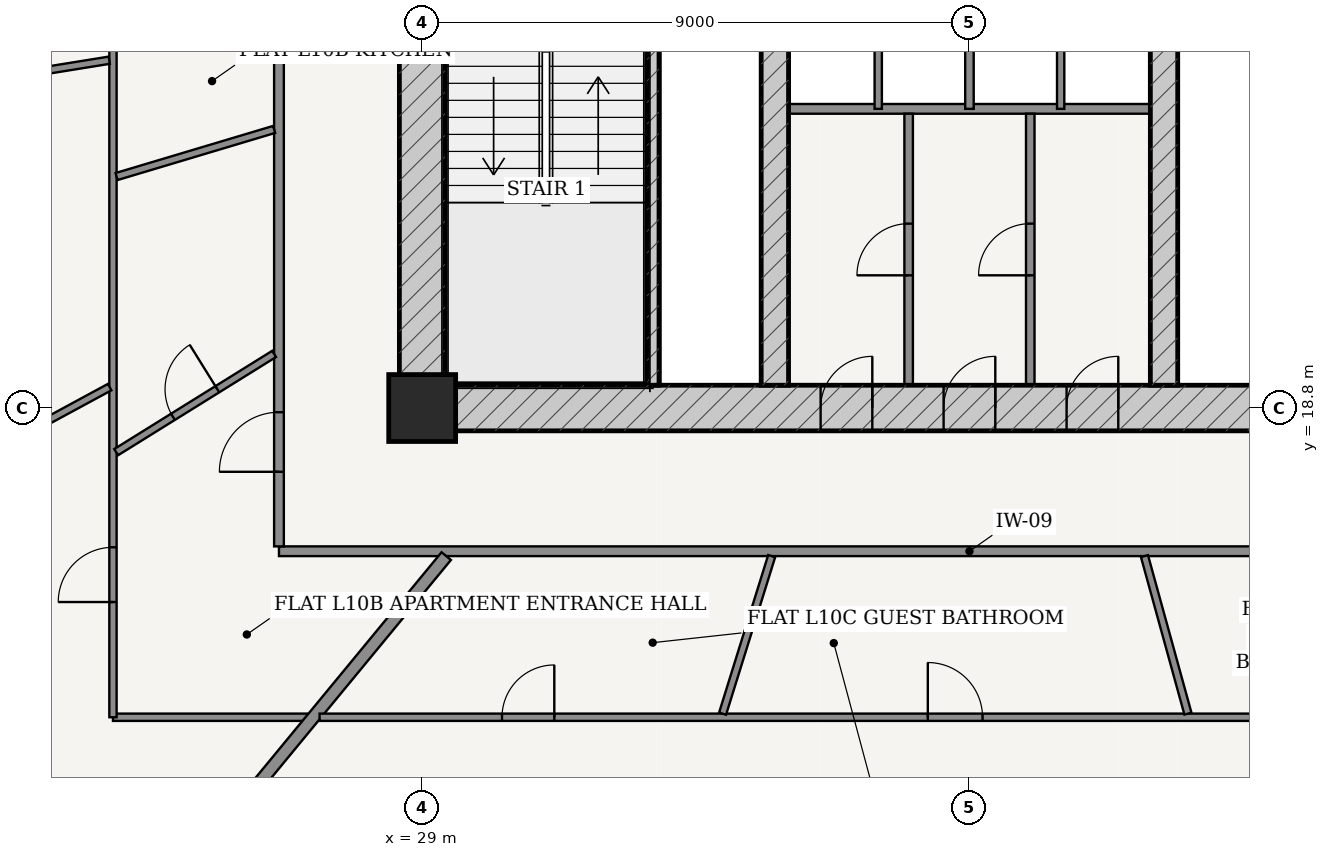
"""IFC4 building model, lengths in metres.
Left out: names, types, materials, properties, quantities, classifications, styles, units other than length and angle.
Written with IfcOpenShell. Run it as: python <this file> out.ifc"""

import sys

from ifc_helpers import new_model, si_unit, direction, frame, frame_2d, origin, origin_2d, place, context, subcontext, project, spatial, rectangle, extrude, source, transform, mapped, element, fill, save


model = new_model("IFC4")
c1 = context("Model", 3, precision=1e-05, world=origin(), true_north=direction((-0.2419218956, 0.970295726276)))
c2 = subcontext(c1, "Body", "Model", "MODEL_VIEW")
j1 = project(units=[si_unit("LENGTHUNIT", "METRE"), si_unit("PLANEANGLEUNIT", "RADIAN")], contexts=[c1])
p1 = place(None, origin())
s1 = spatial("IfcSite", under=j1, at=p1, CompositionType="ELEMENT")
p2 = place(p1, origin())
s2 = spatial("IfcBuilding", under=s1, at=p2, CompositionType="ELEMENT")
p3 = place(p2, frame((0.0, 0.0, 42.0)))
s3 = spatial("IfcBuildingStorey", under=s2, at=p3, CompositionType="ELEMENT", Elevation=42.0)
p4 = place(p3, frame((29.0, 18.8, 0.0), z_axis=(0.0, 0.0, 1.0), x_axis=(1.0, 0.0, 0.0)))
e1 = element("IfcColumn", 1, at=p4, inside=s3, PredefinedType="COLUMN", context=c2, shape_type="SweptSolid", body=[
    extrude(rectangle(XDim=1.1, YDim=1.1, at=origin_2d()), origin(), (0.0, 0.0, 1.0), 3.6),
])
p5 = place(p3, frame((28.625, 18.8, 0.0), z_axis=(0.0, 0.0, 1.0), x_axis=(1.0, 0.0, 0.0)))
e2 = element("IfcWall", 2, at=p5, inside=s3, PredefinedType="SHEAR", context=c2, shape_type="SweptSolid", body=[
    extrude(rectangle(XDim=18.75, YDim=0.75, at=frame_2d((9.375, 0.0))), origin(), (0.0, 0.0, 1.0), 3.32),
])
p6 = place(p5, frame((6.927, 0.0, 0.0)))
e3 = element("IfcOpeningElement", 3, at=p6, cuts=e2, PredefinedType="OPENING", context=c2, shape_type="SweptSolid", body=[
    extrude(rectangle(XDim=0.85, YDim=2.1, at=frame_2d((0.425, 1.05))), frame((0.0, 0.385, 0.0), z_axis=(0.0, -1.0, 0.0), x_axis=(1.0, 0.0, 0.0)), (0.0, 0.0, 1.0), 0.77),
])
p7 = place(p5, frame((8.95, 0.0, 0.0)))
e4 = element("IfcOpeningElement", 4, at=p7, cuts=e2, PredefinedType="OPENING", context=c2, shape_type="SweptSolid", body=[
    extrude(rectangle(XDim=0.85, YDim=2.1, at=frame_2d((0.425, 1.05))), frame((0.0, 0.385, 0.0), z_axis=(0.0, -1.0, 0.0), x_axis=(1.0, 0.0, 0.0)), (0.0, 0.0, 1.0), 0.77),
])
p8 = place(p5, frame((10.972, 0.0, 0.0)))
e5 = element("IfcOpeningElement", 5, at=p8, cuts=e2, PredefinedType="OPENING", context=c2, shape_type="SweptSolid", body=[
    extrude(rectangle(XDim=0.85, YDim=2.1, at=frame_2d((0.425, 1.05))), frame((0.0, 0.385, 0.0), z_axis=(0.0, -1.0, 0.0), x_axis=(1.0, 0.0, 0.0)), (0.0, 0.0, 1.0), 0.77),
])
p9 = place(p3, frame((29.0, 19.175, 0.0), z_axis=(0.0, 0.0, 1.0), x_axis=(0.0, 1.0, 0.0)))
e6 = element("IfcWall", 6, at=p9, inside=s3, PredefinedType="SHEAR", context=c2, shape_type="SweptSolid", body=[
    extrude(rectangle(XDim=15.25, YDim=0.75, at=frame_2d((7.625, 0.0))), origin(), (0.0, 0.0, 1.0), 3.32),
])
p10 = place(p9, frame((9.875, 0.0, 0.0)))
e7 = element("IfcOpeningElement", 7, at=p10, cuts=e6, PredefinedType="OPENING", context=c2, shape_type="SweptSolid", body=[
    extrude(rectangle(XDim=1.5, YDim=2.2, at=frame_2d((0.75, 1.1))), frame((0.0, 0.385, 0.0), z_axis=(0.0, -1.0, 0.0), x_axis=(1.0, 0.0, 0.0)), (0.0, 0.0, 1.0), 0.77),
])
p11 = place(p3, frame((32.795, 19.175, 0.0), z_axis=(0.0, 0.0, 1.0), x_axis=(0.0, 1.0, 0.0)))
e8 = element("IfcWall", 8, at=p11, inside=s3, PredefinedType="SOLIDWALL", context=c2, shape_type="SweptSolid", body=[
    extrude(rectangle(XDim=7.375, YDim=0.2, at=frame_2d((3.688, 0.0))), origin(), (0.0, 0.0, 1.0), 3.32),
])
p12 = place(p3, frame((34.8, 19.175, 0.0), z_axis=(0.0, 0.0, 1.0), x_axis=(0.0, 1.0, 0.0)))
e9 = element("IfcWall", 9, at=p12, inside=s3, PredefinedType="SHEAR", context=c2, shape_type="SweptSolid", body=[
    extrude(rectangle(XDim=15.25, YDim=0.45, at=frame_2d((7.625, 0.0))), origin(), (0.0, 0.0, 1.0), 3.32),
])
p13 = place(p12, frame((7.8, 0.0, 0.0)))
e10 = element("IfcOpeningElement", 10, at=p13, cuts=e9, PredefinedType="OPENING", context=c2, shape_type="SweptSolid", body=[
    extrude(rectangle(XDim=1.05, YDim=2.15, at=frame_2d((0.525, 1.075))), frame((0.0, 0.235, 0.0), z_axis=(0.0, -1.0, 0.0), x_axis=(1.0, 0.0, 0.0)), (0.0, 0.0, 1.0), 0.47),
])
p14 = place(p3, frame((41.2, 19.175, 0.0), z_axis=(0.0, 0.0, 1.0), x_axis=(0.0, 1.0, 0.0)))
e11 = element("IfcWall", 11, at=p14, inside=s3, PredefinedType="SHEAR", context=c2, shape_type="SweptSolid", body=[
    extrude(rectangle(XDim=15.25, YDim=0.45, at=frame_2d((7.625, 0.0))), origin(), (0.0, 0.0, 1.0), 3.32),
])
p15 = place(p14, frame((7.8, 0.0, 0.0)))
e12 = element("IfcOpeningElement", 12, at=p15, cuts=e11, PredefinedType="OPENING", context=c2, shape_type="SweptSolid", body=[
    extrude(rectangle(XDim=1.05, YDim=2.15, at=frame_2d((0.525, 1.075))), frame((0.0, 0.235, 0.0), z_axis=(0.0, -1.0, 0.0), x_axis=(1.0, 0.0, 0.0)), (0.0, 0.0, 1.0), 0.47),
])
p16 = place(p3, frame((35.025, 23.72, 0.0), z_axis=(0.0, 0.0, 1.0), x_axis=(1.0, 0.0, 0.0)))
e13 = element("IfcWall", 13, at=p16, inside=s3, PredefinedType="PARTITIONING", context=c2, shape_type="SweptSolid", body=[
    extrude(rectangle(XDim=5.95, YDim=0.16, at=frame_2d((2.975, 0.0))), origin(), (0.0, 0.0, 1.0), 3.32),
])
p17 = place(p3, frame((36.5, 23.72, 0.0), z_axis=(0.0, 0.0, 1.0), x_axis=(0.0, 1.0, 0.0)))
e14 = element("IfcWall", 14, at=p17, inside=s3, PredefinedType="PARTITIONING", context=c2, shape_type="SweptSolid", body=[
    extrude(rectangle(XDim=2.56, YDim=0.12, at=frame_2d((1.28, 0.0))), origin(), (0.0, 0.0, 1.0), 3.32),
])
p18 = place(p3, frame((38.0, 23.72, 0.0), z_axis=(0.0, 0.0, 1.0), x_axis=(0.0, 1.0, 0.0)))
e15 = element("IfcWall", 15, at=p18, inside=s3, PredefinedType="PARTITIONING", context=c2, shape_type="SweptSolid", body=[
    extrude(rectangle(XDim=2.56, YDim=0.14, at=frame_2d((1.28, 0.0))), origin(), (0.0, 0.0, 1.0), 3.32),
])
p19 = place(p3, frame((39.5, 23.72, 0.0), z_axis=(0.0, 0.0, 1.0), x_axis=(0.0, 1.0, 0.0)))
e16 = element("IfcWall", 16, at=p19, inside=s3, PredefinedType="PARTITIONING", context=c2, shape_type="SweptSolid", body=[
    extrude(rectangle(XDim=2.56, YDim=0.12, at=frame_2d((1.28, 0.0))), origin(), (0.0, 0.0, 1.0), 3.32),
])
p20 = place(p3, frame((37.0, 19.175, 0.0), z_axis=(0.0, 0.0, 1.0), x_axis=(0.0, 1.0, 0.0)))
e17 = element("IfcWall", 17, at=p20, inside=s3, PredefinedType="PARTITIONING", context=c2, shape_type="SweptSolid", body=[
    extrude(rectangle(XDim=4.465, YDim=0.14, at=frame_2d((2.232, 0.0))), origin(), (0.0, 0.0, 1.0), 3.32),
])
p21 = place(p20, frame((1.808, 0.0, 0.0)))
e18 = element("IfcOpeningElement", 18, at=p21, cuts=e17, PredefinedType="OPENING", context=c2, shape_type="SweptSolid", body=[
    extrude(rectangle(XDim=0.85, YDim=2.1, at=frame_2d((0.425, 1.05))), frame((0.0, 0.08, 0.0), z_axis=(0.0, -1.0, 0.0), x_axis=(1.0, 0.0, 0.0)), (0.0, 0.0, 1.0), 0.16),
])
p22 = place(p3, frame((39.0, 19.175, 0.0), z_axis=(0.0, 0.0, 1.0), x_axis=(0.0, 1.0, 0.0)))
e19 = element("IfcWall", 19, at=p22, inside=s3, PredefinedType="PARTITIONING", context=c2, shape_type="SweptSolid", body=[
    extrude(rectangle(XDim=4.465, YDim=0.14, at=frame_2d((2.232, 0.0))), origin(), (0.0, 0.0, 1.0), 3.32),
])
p23 = place(p22, frame((1.808, 0.0, 0.0)))
e20 = element("IfcOpeningElement", 20, at=p23, cuts=e19, PredefinedType="OPENING", context=c2, shape_type="SweptSolid", body=[
    extrude(rectangle(XDim=0.85, YDim=2.1, at=frame_2d((0.425, 1.05))), frame((0.0, 0.08, 0.0), z_axis=(0.0, -1.0, 0.0), x_axis=(1.0, 0.0, 0.0)), (0.0, 0.0, 1.0), 0.16),
])
p24 = place(p3, frame((26.645, 16.445, 0.0), z_axis=(0.0, 0.0, 1.0), x_axis=(1.0, 0.0, 0.0)))
e21 = element("IfcWall", 21, at=p24, inside=s3, PredefinedType="PARTITIONING", context=c2, shape_type="SweptSolid", body=[
    extrude(rectangle(XDim=22.71, YDim=0.16, at=frame_2d((11.355, 0.0))), origin(), (0.0, 0.0, 1.0), 2.688),
])
p25 = place(p3, frame((26.645, 16.525, 0.0), z_axis=(0.0, 0.0, 1.0), x_axis=(0.0, 1.0, 0.0)))
e22 = element("IfcWall", 22, at=p25, inside=s3, PredefinedType="PARTITIONING", context=c2, shape_type="SweptSolid", body=[
    extrude(rectangle(XDim=20.55, YDim=0.16, at=frame_2d((10.275, 0.0))), origin(), (0.0, 0.0, 1.0), 2.688),
])
p26 = place(p25, frame((1.226, 0.0, 0.0)))
e23 = element("IfcOpeningElement", 23, at=p26, cuts=e22, PredefinedType="OPENING", context=c2, shape_type="SweptSolid", body=[
    extrude(rectangle(XDim=0.98, YDim=2.2, at=frame_2d((0.49, 1.1))), frame((0.0, 0.09, 0.0), z_axis=(0.0, -1.0, 0.0), x_axis=(1.0, 0.0, 0.0)), (0.0, 0.0, 1.0), 0.18),
])
p27 = place(p3, frame((27.109, 13.715, 0.0), z_axis=(0.0, 0.0, 1.0), x_axis=(-1.0, 0.0, 0.0)))
e24 = element("IfcWall", 24, at=p27, inside=s3, PredefinedType="PARTITIONING", context=c2, shape_type="SweptSolid", body=[
    extrude(rectangle(XDim=3.194, YDim=0.12, at=frame_2d((1.597, 0.0))), origin(), (0.0, 0.0, 1.0), 2.688),
])
p28 = place(p3, frame((23.915, 13.715, 0.0), z_axis=(0.0, 0.0, 1.0), x_axis=(0.0, 1.0, 0.0)))
e25 = element("IfcWall", 25, at=p28, inside=s3, PredefinedType="PARTITIONING", context=c2, shape_type="SweptSolid", body=[
    extrude(rectangle(XDim=26.17, YDim=0.12, at=frame_2d((13.085, 0.0))), origin(), (0.0, 0.0, 1.0), 2.688),
])
p29 = place(p28, frame((1.895, 0.0, 0.0)))
e26 = element("IfcOpeningElement", 26, at=p29, cuts=e25, PredefinedType="OPENING", context=c2, shape_type="SweptSolid", body=[
    extrude(rectangle(XDim=0.9, YDim=2.15, at=frame_2d((0.45, 1.075))), frame((0.0, 0.07, 0.0), z_axis=(0.0, -1.0, 0.0), x_axis=(1.0, 0.0, 0.0)), (0.0, 0.0, 1.0), 0.14),
])
p30 = place(p28, frame((11.498, 0.0, 0.0)))
e27 = element("IfcOpeningElement", 27, at=p30, cuts=e25, PredefinedType="OPENING", context=c2, shape_type="SweptSolid", body=[
    extrude(rectangle(XDim=0.9, YDim=2.15, at=frame_2d((0.45, 1.075))), frame((0.0, 0.07, 0.0), z_axis=(0.0, -1.0, 0.0), x_axis=(1.0, 0.0, 0.0)), (0.0, 0.0, 1.0), 0.14),
])
p31 = place(p28, frame((23.831, 0.0, 0.0)))
e28 = element("IfcOpeningElement", 28, at=p31, cuts=e25, PredefinedType="OPENING", context=c2, shape_type="SweptSolid", body=[
    extrude(rectangle(XDim=0.86, YDim=2.15, at=frame_2d((0.43, 1.075))), frame((0.0, 0.07, 0.0), z_axis=(0.0, -1.0, 0.0), x_axis=(1.0, 0.0, 0.0)), (0.0, 0.0, 1.0), 0.14),
])
p32 = place(p3, frame((23.854, 24.52, 0.0), z_axis=(0.0, 0.0, 1.0), x_axis=(-0.987258444847, -0.159124991997, 0.0)))
e29 = element("IfcWall", 29, at=p32, inside=s3, PredefinedType="PARTITIONING", context=c2, shape_type="SweptSolid", body=[
    extrude(rectangle(XDim=14.359, YDim=0.12, at=frame_2d((7.18, 0.0))), origin(), (0.0, 0.0, 1.0), 2.688),
])
p33 = place(p32, frame((5.659, 0.0, 0.0)))
e30 = element("IfcOpeningElement", 30, at=p33, cuts=e29, PredefinedType="OPENING", context=c2, shape_type="SweptSolid", body=[
    extrude(rectangle(XDim=0.9, YDim=2.15, at=frame_2d((0.45, 1.075))), frame((0.0, 0.07, 0.0), z_axis=(0.0, -1.0, 0.0), x_axis=(1.0, 0.0, 0.0)), (0.0, 0.0, 1.0), 0.14),
])
p34 = place(p3, frame((23.861, 19.144, 0.0), z_axis=(0.0, 0.0, 1.0), x_axis=(-0.879372452045, -0.476134529922, 0.0)))
e31 = element("IfcWall", 31, at=p34, inside=s3, PredefinedType="PARTITIONING", context=c2, shape_type="SweptSolid", body=[
    extrude(rectangle(XDim=11.219, YDim=0.12, at=frame_2d((5.61, 0.0))), origin(), (0.0, 0.0, 1.0), 2.688),
])
p35 = place(p34, frame((4.097, 0.0, 0.0)))
e32 = element("IfcOpeningElement", 32, at=p35, cuts=e31, PredefinedType="OPENING", context=c2, shape_type="SweptSolid", body=[
    extrude(rectangle(XDim=0.9, YDim=2.15, at=frame_2d((0.45, 1.075))), frame((0.0, 0.07, 0.0), z_axis=(0.0, -1.0, 0.0), x_axis=(1.0, 0.0, 0.0)), (0.0, 0.0, 1.0), 0.14),
])
p36 = place(p3, frame((26.565, 23.382, 0.0), z_axis=(0.0, 0.0, 1.0), x_axis=(-0.958081868855, -0.286494559408, 0.0)))
e33 = element("IfcWall", 33, at=p36, inside=s3, PredefinedType="PARTITIONING", context=c2, shape_type="SweptSolid", body=[
    extrude(rectangle(XDim=2.704, YDim=0.12, at=frame_2d((1.352, 0.0))), origin(), (0.0, 0.0, 1.0), 3.32),
])
p37 = place(p3, frame((26.565, 19.69, 0.0), z_axis=(0.0, 0.0, 1.0), x_axis=(-0.849229217796, -0.52802437031, 0.0)))
e34 = element("IfcWall", 34, at=p37, inside=s3, PredefinedType="PARTITIONING", context=c2, shape_type="SweptSolid", body=[
    extrude(rectangle(XDim=3.059, YDim=0.12, at=frame_2d((1.529, 0.0))), origin(), (0.0, 0.0, 1.0), 3.32),
])
p38 = place(p37, frame((1.099, 0.0, 0.0)))
e35 = element("IfcOpeningElement", 35, at=p38, cuts=e34, PredefinedType="OPENING", context=c2, shape_type="SweptSolid", body=[
    extrude(rectangle(XDim=0.86, YDim=2.15, at=frame_2d((0.43, 1.075))), frame((0.0, 0.07, 0.0), z_axis=(0.0, -1.0, 0.0), x_axis=(1.0, 0.0, 0.0)), (0.0, 0.0, 1.0), 0.14),
])
p39 = place(p3, frame((29.396, 16.365, 0.0), z_axis=(0.0, 0.0, 1.0), x_axis=(-0.636186165667, -0.771535587393, 0.0)))
e36 = element("IfcWall", 36, at=p39, inside=s3, PredefinedType="PARTITIONING", context=c2, shape_type="SweptSolid", body=[
    extrude(rectangle(XDim=11.683, YDim=0.2, at=frame_2d((5.842, 0.0))), origin(), (0.0, 0.0, 1.0), 2.688),
])
p40 = place(p3, frame((52.085, 13.715, 0.0), z_axis=(0.0, 0.0, 1.0), x_axis=(-1.0, 0.0, 0.0)))
e37 = element("IfcWall", 37, at=p40, inside=s3, PredefinedType="PARTITIONING", context=c2, shape_type="SweptSolid", body=[
    extrude(rectangle(XDim=24.772, YDim=0.12, at=frame_2d((12.386, 0.0))), origin(), (0.0, 0.0, 1.0), 2.688),
])
p41 = place(p40, frame((20.912, 0.0, 0.0)))
e38 = element("IfcOpeningElement", 38, at=p41, cuts=e37, PredefinedType="OPENING", context=c2, shape_type="SweptSolid", body=[
    extrude(rectangle(XDim=0.86, YDim=2.15, at=frame_2d((0.43, 1.075))), frame((0.0, 0.07, 0.0), z_axis=(0.0, -1.0, 0.0), x_axis=(1.0, 0.0, 0.0)), (0.0, 0.0, 1.0), 0.14),
])
p42 = place(p40, frame((13.87, 0.0, 0.0)))
e39 = element("IfcOpeningElement", 39, at=p42, cuts=e37, PredefinedType="OPENING", context=c2, shape_type="SweptSolid", body=[
    extrude(rectangle(XDim=0.9, YDim=2.15, at=frame_2d((0.45, 1.075))), frame((0.0, 0.07, 0.0), z_axis=(0.0, -1.0, 0.0), x_axis=(1.0, 0.0, 0.0)), (0.0, 0.0, 1.0), 0.14),
])
p43 = place(p3, frame((34.748, 16.365, 0.0), z_axis=(0.0, 0.0, 1.0), x_axis=(-0.297598752493, -0.954691040345, 0.0)))
e40 = element("IfcWall", 40, at=p43, inside=s3, PredefinedType="PARTITIONING", context=c2, shape_type="SweptSolid", body=[
    extrude(rectangle(XDim=2.714, YDim=0.12, at=frame_2d((1.357, 0.0))), origin(), (0.0, 0.0, 1.0), 3.32),
])
p44 = place(p3, frame((40.878, 16.365, 0.0), z_axis=(0.0, 0.0, 1.0), x_axis=(0.265853298244, -0.964013497734, 0.0)))
e41 = element("IfcWall", 41, at=p44, inside=s3, PredefinedType="PARTITIONING", context=c2, shape_type="SweptSolid", body=[
    extrude(rectangle(XDim=2.687, YDim=0.12, at=frame_2d((1.344, 0.0))), origin(), (0.0, 0.0, 1.0), 3.32),
])
m1 = source(origin(), c2, "Body", "SweptSolid", [
    extrude(rectangle(XDim=0.85, YDim=2.1, at=frame_2d((0.425, 1.05))), frame((0.0, 0.025, 0.0), z_axis=(0.0, -1.0, 0.0), x_axis=(1.0, 0.0, 0.0)), (0.0, 0.0, 1.0), 0.05),
])
p45 = place(p6, origin())
e42 = element("IfcDoor", 42, at=p45, inside=s3, OperationType="SINGLE_SWING_RIGHT", PredefinedType="DOOR", context=c2, shape_type="MappedRepresentation", body=[
    mapped(m1, transform((0.0, 0.0, 0.0), scale=1.0)),
])
fill(e3, e42)
p46 = place(p7, origin())
e43 = element("IfcDoor", 43, at=p46, inside=s3, OperationType="SINGLE_SWING_RIGHT", PredefinedType="DOOR", context=c2, shape_type="MappedRepresentation", body=[
    mapped(m1, transform((0.0, 0.0, 0.0), scale=1.0)),
])
fill(e4, e43)
p47 = place(p8, origin())
e44 = element("IfcDoor", 44, at=p47, inside=s3, OperationType="SINGLE_SWING_RIGHT", PredefinedType="DOOR", context=c2, shape_type="MappedRepresentation", body=[
    mapped(m1, transform((0.0, 0.0, 0.0), scale=1.0)),
])
fill(e5, e44)
p48 = place(p21, origin())
e45 = element("IfcDoor", 45, at=p48, inside=s3, OperationType="SINGLE_SWING_LEFT", PredefinedType="DOOR", context=c2, shape_type="MappedRepresentation", body=[
    mapped(m1, transform((0.0, 0.0, 0.0), scale=1.0)),
])
fill(e18, e45)
p49 = place(p23, origin())
e46 = element("IfcDoor", 46, at=p49, inside=s3, OperationType="SINGLE_SWING_LEFT", PredefinedType="DOOR", context=c2, shape_type="MappedRepresentation", body=[
    mapped(m1, transform((0.0, 0.0, 0.0), scale=1.0)),
])
fill(e20, e46)
m2 = source(origin(), c2, "Body", "SweptSolid", [
    extrude(rectangle(XDim=0.98, YDim=2.2, at=frame_2d((0.49, 1.1))), frame((0.0, 0.025, 0.0), z_axis=(0.0, -1.0, 0.0), x_axis=(1.0, 0.0, 0.0)), (0.0, 0.0, 1.0), 0.05),
])
p50 = place(p26, origin())
e47 = element("IfcDoor", 47, at=p50, inside=s3, OperationType="SINGLE_SWING_LEFT", PredefinedType="DOOR", context=c2, shape_type="MappedRepresentation", body=[
    mapped(m2, transform((0.0, 0.0, 0.0), scale=1.0)),
])
fill(e23, e47)
m3 = source(origin(), c2, "Body", "SweptSolid", [
    extrude(rectangle(XDim=0.86, YDim=2.15, at=frame_2d((0.43, 1.075))), frame((0.0, 0.025, 0.0), z_axis=(0.0, -1.0, 0.0), x_axis=(1.0, 0.0, 0.0)), (0.0, 0.0, 1.0), 0.05),
])
p51 = place(p38, frame((0.86, 0.0, 0.0), z_axis=(0.0, 0.0, 1.0), x_axis=(-1.0, 0.0, 0.0)))
e48 = element("IfcDoor", 48, at=p51, inside=s3, OperationType="SINGLE_SWING_RIGHT", PredefinedType="DOOR", context=c2, shape_type="MappedRepresentation", body=[
    mapped(m3, transform((0.0, 0.0, 0.0), scale=1.0)),
])
fill(e35, e48)
m4 = source(origin(), c2, "Body", "SweptSolid", [
    extrude(rectangle(XDim=0.9, YDim=2.15, at=frame_2d((0.45, 1.075))), frame((0.0, 0.025, 0.0), z_axis=(0.0, -1.0, 0.0), x_axis=(1.0, 0.0, 0.0)), (0.0, 0.0, 1.0), 0.05),
])
p52 = place(p29, origin())
e49 = element("IfcDoor", 49, at=p52, inside=s3, OperationType="SINGLE_SWING_LEFT", PredefinedType="DOOR", context=c2, shape_type="MappedRepresentation", body=[
    mapped(m4, transform((0.0, 0.0, 0.0), scale=1.0)),
])
fill(e26, e49)
p53 = place(p41, frame((0.86, 0.0, 0.0), z_axis=(0.0, 0.0, 1.0), x_axis=(-1.0, 0.0, 0.0)))
e50 = element("IfcDoor", 50, at=p53, inside=s3, OperationType="SINGLE_SWING_RIGHT", PredefinedType="DOOR", context=c2, shape_type="MappedRepresentation", body=[
    mapped(m3, transform((0.0, 0.0, 0.0), scale=1.0)),
])
fill(e38, e50)
p54 = place(p42, frame((0.9, 0.0, 0.0), z_axis=(0.0, 0.0, 1.0), x_axis=(-1.0, 0.0, 0.0)))
e51 = element("IfcDoor", 51, at=p54, inside=s3, OperationType="SINGLE_SWING_LEFT", PredefinedType="DOOR", context=c2, shape_type="MappedRepresentation", body=[
    mapped(m4, transform((0.0, 0.0, 0.0), scale=1.0)),
])
fill(e39, e51)
save(model, sys.argv[1])
